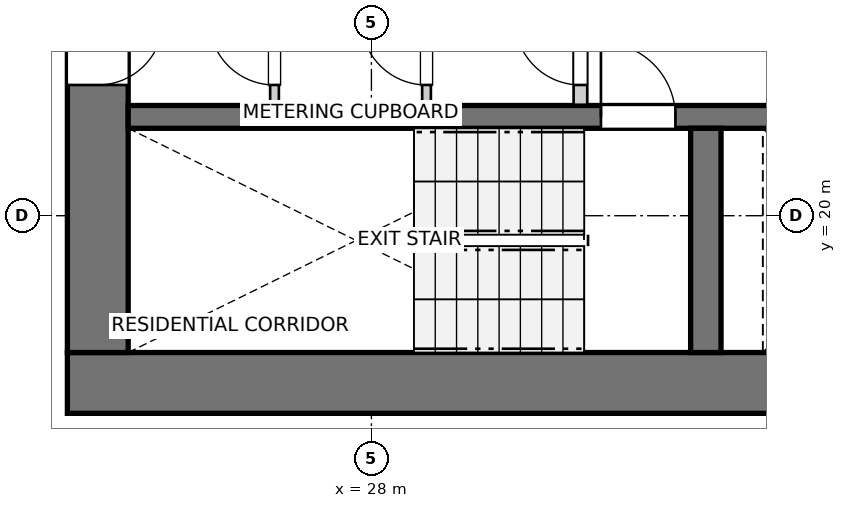
"""IFC4 building model, lengths in metres.
Left out: names, types, materials, properties, quantities, classifications, styles, units other than length and angle.
Written with IfcOpenShell. Run it as: python <this file> out.ifc"""

import sys

from ifc_helpers import new_model, si_unit, direction, frame, frame_2d, origin, place, context, subcontext, project, spatial, rectangle, extrude, source, transform, mapped, element, fill, save


model = new_model("IFC4")
c1 = context("Model", 3, precision=1e-05, world=origin(), true_north=direction((0.0, 1.0)))
c2 = subcontext(c1, "Body", "Model", "MODEL_VIEW")
j1 = project(units=[si_unit("LENGTHUNIT", "METRE"), si_unit("PLANEANGLEUNIT", "RADIAN")], contexts=[c1])
p1 = place(None, origin())
s1 = spatial("IfcSite", under=j1, at=p1, CompositionType="ELEMENT")
p2 = place(p1, origin())
s2 = spatial("IfcBuilding", under=s1, at=p2, CompositionType="ELEMENT")
p3 = place(p2, frame((0.0, 0.0, 27.0)))
s3 = spatial("IfcBuildingStorey", under=s2, at=p3, CompositionType="ELEMENT", Elevation=27.0)
p4 = place(p3, frame((24.0, 17.8, 0.0), z_axis=(0.0, 0.0, 1.0), x_axis=(1.0, 0.0, 0.0)))
e1 = element("IfcWall", 1, at=p4, inside=s3, PredefinedType="SHEAR", context=c2, shape_type="SweptSolid", body=[
    extrude(rectangle(XDim=12.7, YDim=0.8, at=frame_2d((6.35, 0.0))), origin(), (0.0, 0.0, 1.0), 2.935),
])
p5 = place(p3, frame((24.4, 33.8, 0.0), z_axis=(0.0, 0.0, 1.0), x_axis=(0.0, -1.0, 0.0)))
e2 = element("IfcWall", 2, at=p5, inside=s3, PredefinedType="SHEAR", context=c2, shape_type="SweptSolid", body=[
    extrude(rectangle(XDim=15.6, YDim=0.8, at=frame_2d((7.8, 0.0))), origin(), (0.0, 0.0, 1.0), 2.935),
])
p6 = place(p5, frame((7.05, 0.0, 0.0)))
e3 = element("IfcOpeningElement", 3, at=p6, cuts=e2, PredefinedType="OPENING", context=c2, shape_type="SweptSolid", body=[
    extrude(rectangle(XDim=1.5, YDim=2.15, at=frame_2d((0.75, 1.075))), frame((0.0, 0.41, 0.0), z_axis=(0.0, -1.0, 0.0), x_axis=(1.0, 0.0, 0.0)), (0.0, 0.0, 1.0), 0.82),
])
p7 = place(p5, frame((3.52, 0.0, 0.0)))
e4 = element("IfcOpeningElement", 4, at=p7, cuts=e2, PredefinedType="OPENING", context=c2, shape_type="SweptSolid", body=[
    extrude(rectangle(XDim=0.86, YDim=2.05, at=frame_2d((0.43, 1.025))), frame((0.0, 0.41, 0.0), z_axis=(0.0, -1.0, 0.0), x_axis=(1.0, 0.0, 0.0)), (0.0, 0.0, 1.0), 0.82),
])
p8 = place(p5, frame((11.22, 0.0, 0.0)))
e5 = element("IfcOpeningElement", 5, at=p8, cuts=e2, PredefinedType="OPENING", context=c2, shape_type="SweptSolid", body=[
    extrude(rectangle(XDim=0.86, YDim=2.05, at=frame_2d((0.43, 1.025))), frame((0.0, 0.41, 0.0), z_axis=(0.0, -1.0, 0.0), x_axis=(1.0, 0.0, 0.0)), (0.0, 0.0, 1.0), 0.82),
])
p9 = place(p3, frame((24.8, 21.3, 0.0), z_axis=(0.0, 0.0, 1.0), x_axis=(1.0, 0.0, 0.0)))
e6 = element("IfcWall", 6, at=p9, inside=s3, PredefinedType="SHEAR", context=c2, shape_type="SweptSolid", body=[
    extrude(rectangle(XDim=11.1, YDim=0.3, at=frame_2d((5.55, 0.0))), origin(), (0.0, 0.0, 1.0), 2.935),
])
p10 = place(p9, frame((6.22, 0.0, 0.0)))
e7 = element("IfcOpeningElement", 7, at=p10, cuts=e6, PredefinedType="OPENING", context=c2, shape_type="SweptSolid", body=[
    extrude(rectangle(XDim=0.98, YDim=2.15, at=frame_2d((0.49, 1.075))), frame((0.0, 0.16, 0.0), z_axis=(0.0, -1.0, 0.0), x_axis=(1.0, 0.0, 0.0)), (0.0, 0.0, 1.0), 0.32),
])
p11 = place(p9, frame((9.15, 0.0, 0.0)))
e8 = element("IfcOpeningElement", 8, at=p11, cuts=e6, PredefinedType="OPENING", context=c2, shape_type="SweptSolid", body=[
    extrude(rectangle(XDim=1.15, YDim=2.15, at=frame_2d((0.575, 1.075))), frame((0.0, 0.16, 0.0), z_axis=(0.0, -1.0, 0.0), x_axis=(1.0, 0.0, 0.0)), (0.0, 0.0, 1.0), 0.32),
])
p12 = place(p3, frame((32.4, 18.2, 0.0), z_axis=(0.0, 0.0, 1.0), x_axis=(0.0, 1.0, 0.0)))
e9 = element("IfcWall", 9, at=p12, inside=s3, PredefinedType="SHEAR", context=c2, shape_type="SweptSolid", body=[
    extrude(rectangle(XDim=2.95, YDim=0.4, at=frame_2d((1.475, 0.0))), origin(), (0.0, 0.0, 1.0), 2.935),
])
p13 = place(p3, frame((30.75, 21.46, 0.0), z_axis=(0.0, 0.0, 1.0), x_axis=(0.0, 1.0, 0.0)))
e10 = element("IfcWall", 10, at=p13, inside=s3, PredefinedType="PARTITIONING", context=c2, shape_type="SweptSolid", body=[
    extrude(rectangle(XDim=3.11, YDim=0.18, at=frame_2d((1.555, 0.0))), origin(), (0.0, 0.0, 1.0), 2.935),
])
p14 = place(p13, frame((0.26, 0.0, 0.0)))
e11 = element("IfcOpeningElement", 11, at=p14, cuts=e10, PredefinedType="OPENING", context=c2, shape_type="SweptSolid", body=[
    extrude(rectangle(XDim=0.86, YDim=2.05, at=frame_2d((0.43, 1.025))), frame((0.0, 0.1, 0.0), z_axis=(0.0, -1.0, 0.0), x_axis=(1.0, 0.0, 0.0)), (0.0, 0.0, 1.0), 0.2),
])
p15 = place(p3, frame((26.725, 21.46, 0.0), z_axis=(0.0, 0.0, 1.0), x_axis=(0.0, 1.0, 0.0)))
e12 = element("IfcWall", 12, at=p15, inside=s3, PredefinedType="PARTITIONING", context=c2, shape_type="SweptSolid", body=[
    extrude(rectangle(XDim=1.38, YDim=0.115, at=frame_2d((0.69, 0.0))), origin(), (0.0, 0.0, 1.0), 2.935),
])
p16 = place(p15, frame((0.26, 0.0, 0.0)))
e13 = element("IfcOpeningElement", 13, at=p16, cuts=e12, PredefinedType="OPENING", context=c2, shape_type="SweptSolid", body=[
    extrude(rectangle(XDim=0.86, YDim=2.05, at=frame_2d((0.43, 1.025))), frame((0.0, 0.067, 0.0), z_axis=(0.0, -1.0, 0.0), x_axis=(1.0, 0.0, 0.0)), (0.0, 0.0, 1.0), 0.135),
])
p17 = place(p3, frame((28.725, 21.46, 0.0), z_axis=(0.0, 0.0, 1.0), x_axis=(0.0, 1.0, 0.0)))
e14 = element("IfcWall", 14, at=p17, inside=s3, PredefinedType="PARTITIONING", context=c2, shape_type="SweptSolid", body=[
    extrude(rectangle(XDim=1.38, YDim=0.115, at=frame_2d((0.69, 0.0))), origin(), (0.0, 0.0, 1.0), 2.935),
])
p18 = place(p17, frame((0.26, 0.0, 0.0)))
e15 = element("IfcOpeningElement", 15, at=p18, cuts=e14, PredefinedType="OPENING", context=c2, shape_type="SweptSolid", body=[
    extrude(rectangle(XDim=0.86, YDim=2.05, at=frame_2d((0.43, 1.025))), frame((0.0, 0.067, 0.0), z_axis=(0.0, -1.0, 0.0), x_axis=(1.0, 0.0, 0.0)), (0.0, 0.0, 1.0), 0.135),
])
m1 = source(origin(), c2, "Body", "SweptSolid", [
    extrude(rectangle(XDim=0.98, YDim=2.15, at=frame_2d((0.49, 1.075))), frame((0.0, 0.025, 0.0), z_axis=(0.0, -1.0, 0.0), x_axis=(1.0, 0.0, 0.0)), (0.0, 0.0, 1.0), 0.05),
])
p19 = place(p10, origin())
e16 = element("IfcDoor", 16, at=p19, inside=s3, OperationType="SINGLE_SWING_LEFT", PredefinedType="DOOR", context=c2, shape_type="MappedRepresentation", body=[
    mapped(m1, transform((0.0, 0.0, 0.0), x_axis=(1.0, 0.0, 0.0), y_axis=(0.0, 1.0, 0.0), z_axis=(0.0, 0.0, 1.0), scale=1.0)),
])
fill(e7, e16)
m2 = source(origin(), c2, "Body", "SweptSolid", [
    extrude(rectangle(XDim=0.86, YDim=2.05, at=frame_2d((0.43, 1.025))), frame((0.0, 0.025, 0.0), z_axis=(0.0, -1.0, 0.0), x_axis=(1.0, 0.0, 0.0)), (0.0, 0.0, 1.0), 0.05),
])
p20 = place(p8, origin())
e17 = element("IfcDoor", 17, at=p20, inside=s3, OperationType="SINGLE_SWING_LEFT", PredefinedType="DOOR", context=c2, shape_type="MappedRepresentation", body=[
    mapped(m2, transform((0.0, 0.0, 0.0), x_axis=(1.0, 0.0, 0.0), y_axis=(0.0, 1.0, 0.0), z_axis=(0.0, 0.0, 1.0), scale=1.0)),
])
fill(e5, e17)
p21 = place(p14, origin())
e18 = element("IfcDoor", 18, at=p21, inside=s3, OperationType="SINGLE_SWING_RIGHT", PredefinedType="DOOR", context=c2, shape_type="MappedRepresentation", body=[
    mapped(m2, transform((0.0, 0.0, 0.0), x_axis=(1.0, 0.0, 0.0), y_axis=(0.0, 1.0, 0.0), z_axis=(0.0, 0.0, 1.0), scale=1.0)),
])
fill(e11, e18)
p22 = place(p16, origin())
e19 = element("IfcDoor", 19, at=p22, inside=s3, OperationType="SINGLE_SWING_RIGHT", PredefinedType="DOOR", context=c2, shape_type="MappedRepresentation", body=[
    mapped(m2, transform((0.0, 0.0, 0.0), x_axis=(1.0, 0.0, 0.0), y_axis=(0.0, 1.0, 0.0), z_axis=(0.0, 0.0, 1.0), scale=1.0)),
])
fill(e13, e19)
p23 = place(p18, origin())
e20 = element("IfcDoor", 20, at=p23, inside=s3, OperationType="SINGLE_SWING_RIGHT", PredefinedType="DOOR", context=c2, shape_type="MappedRepresentation", body=[
    mapped(m2, transform((0.0, 0.0, 0.0), x_axis=(1.0, 0.0, 0.0), y_axis=(0.0, 1.0, 0.0), z_axis=(0.0, 0.0, 1.0), scale=1.0)),
])
fill(e15, e20)
save(model, sys.argv[1])
